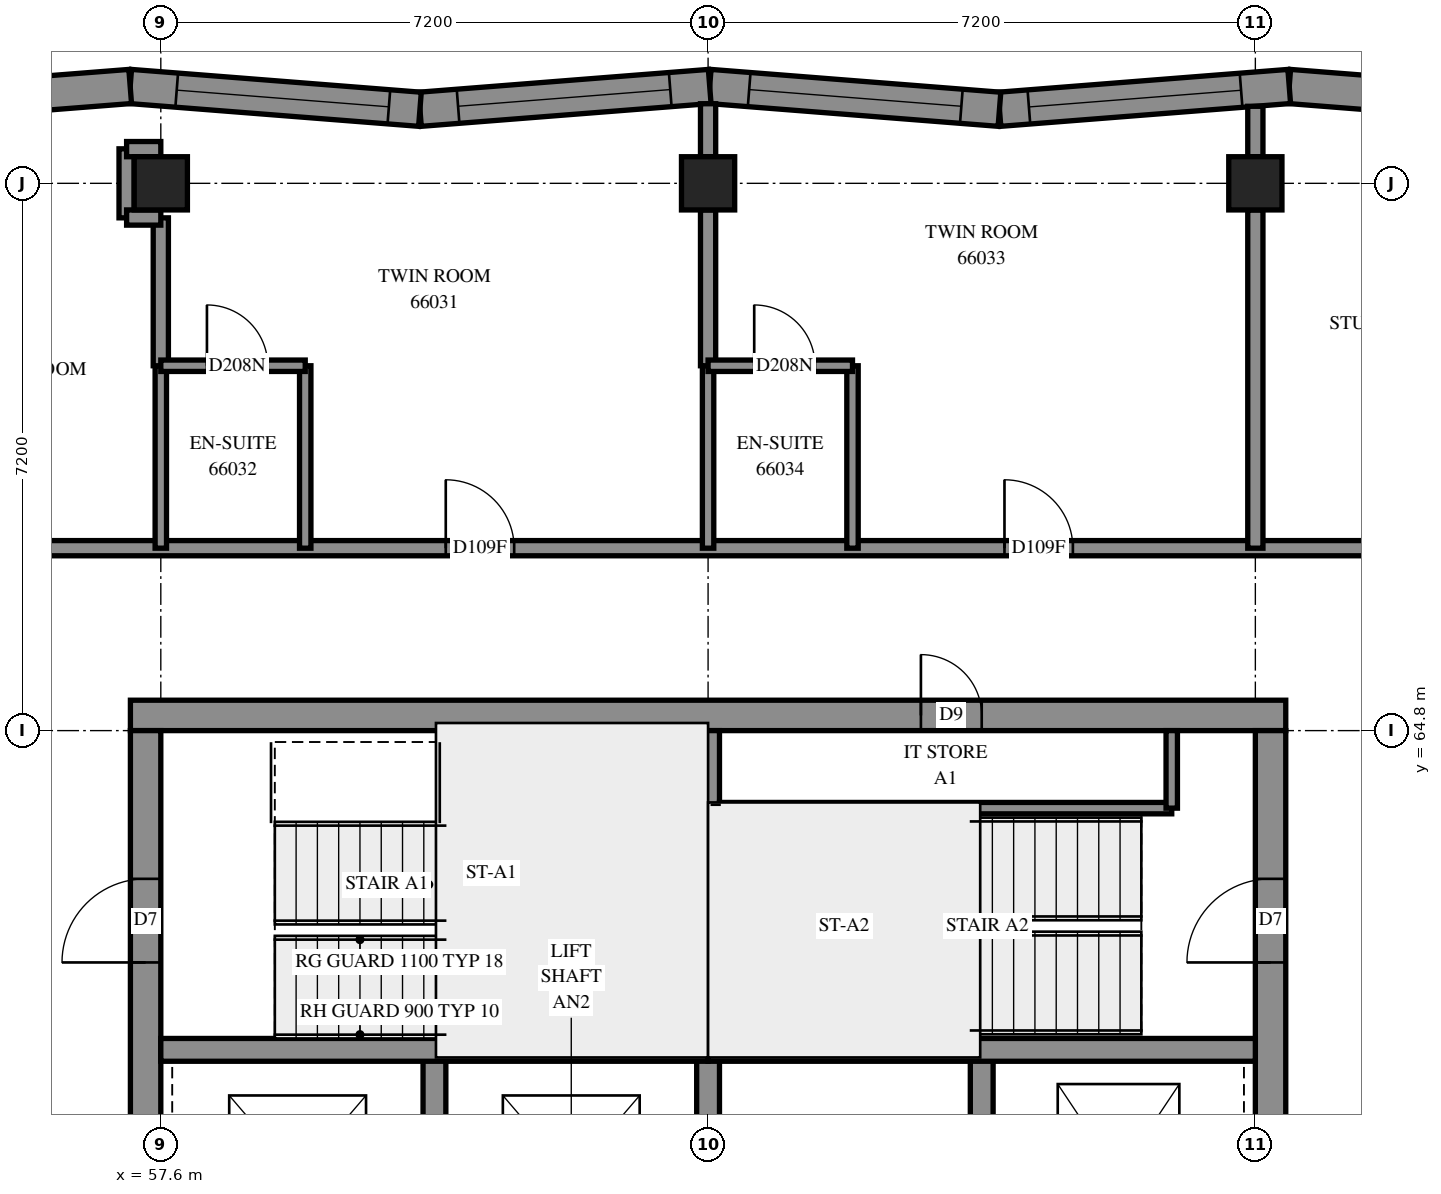
"""IFC4 building model, lengths in metres.
Left out: names, types, materials, properties, quantities, classifications, styles, units other than length and angle.
Written with IfcOpenShell. Run it as: python <this file> out.ifc"""

import sys

from ifc_helpers import new_model, si_unit, direction, frame, frame_2d, origin, origin_2d, place, context, subcontext, project, spatial, polyline, rectangle, outline, extrude, element, fill, save


model = new_model("IFC4")
c1 = context("Model", 3, precision=1e-05, world=origin(), true_north=direction((0.0, 1.0)))
c2 = subcontext(c1, "Body", "Model", "MODEL_VIEW")
j1 = project(units=[si_unit("LENGTHUNIT", "METRE"), si_unit("PLANEANGLEUNIT", "RADIAN")], contexts=[c1])
p1 = place(None, origin())
s1 = spatial("IfcSite", under=j1, at=p1, CompositionType="ELEMENT")
p2 = place(p1, origin())
s2 = spatial("IfcBuilding", under=s1, at=p2, CompositionType="ELEMENT")
p3 = place(p2, frame((0.0, 0.0, 243.8)))
s3 = spatial("IfcBuildingStorey", under=s2, at=p3, CompositionType="ELEMENT", Elevation=243.8)
for number, where, z_axis, x_axis in (
    (1, (57.6, 72.0, 0.0), (0.0, 0.0, 1.0), (1.0, 0.0, 0.0)),
    (2, (64.8, 72.0, 0.0), (0.0, 0.0, 1.0), (1.0, 0.0, 0.0)),
    (3, (72.0, 72.0, 0.0), (0.0, 0.0, 1.0), (1.0, 0.0, 0.0)),
):
    element("IfcColumn", number, at=place(p3, frame(where, z_axis=z_axis, x_axis=x_axis)), inside=s3, PredefinedType="COLUMN", context=c2, shape_type="SweptSolid", body=[
        extrude(rectangle(XDim=0.7, YDim=0.7, at=origin_2d()), origin(), (0.0, 0.0, 1.0), 3.1),
    ])
p4 = place(p3, frame((57.2, 65.0, -0.3), z_axis=(0.0, 0.0, 1.0), x_axis=(1.0, 0.0, 0.0)))
e4 = element("IfcWall", 4, at=p4, inside=s3, PredefinedType="SHEAR", context=c2, shape_type="SweptSolid", body=[
    extrude(rectangle(XDim=15.2, YDim=0.4, at=frame_2d((7.6, 0.0))), origin(), (0.0, 0.0, 1.0), 2.7),
])
p5 = place(p4, frame((10.4, 0.0, 0.3)))
e5 = element("IfcOpeningElement", 5, at=p5, cuts=e4, PredefinedType="OPENING", context=c2, shape_type="SweptSolid", body=[
    extrude(rectangle(XDim=0.8, YDim=2.1, at=frame_2d((0.4, 1.05))), frame((0.0, 0.21, 0.0), z_axis=(0.0, -1.0, 0.0), x_axis=(1.0, 0.0, 0.0)), (0.0, 0.0, 1.0), 0.42),
])
p6 = place(p3, frame((57.4, 50.4, -0.3), z_axis=(0.0, 0.0, 1.0), x_axis=(0.0, 1.0, 0.0)))
e6 = element("IfcWall", 6, at=p6, inside=s3, PredefinedType="SHEAR", context=c2, shape_type="SweptSolid", body=[
    extrude(rectangle(XDim=14.4, YDim=0.4, at=frame_2d((7.2, 0.0))), origin(), (0.0, 0.0, 1.0), 2.7),
])
p7 = place(p6, frame((4.55, 0.0, 0.3)))
e7 = element("IfcOpeningElement", 7, at=p7, cuts=e6, PredefinedType="OPENING", context=c2, shape_type="SweptSolid", body=[
    extrude(rectangle(XDim=1.1, YDim=2.1, at=frame_2d((0.55, 1.05))), frame((0.0, 0.21, 0.0), z_axis=(0.0, -1.0, 0.0), x_axis=(1.0, 0.0, 0.0)), (0.0, 0.0, 1.0), 0.42),
])
p8 = place(p6, frame((11.35, 0.0, 0.3)))
e8 = element("IfcOpeningElement", 8, at=p8, cuts=e6, PredefinedType="OPENING", context=c2, shape_type="SweptSolid", body=[
    extrude(rectangle(XDim=1.1, YDim=2.1, at=frame_2d((0.55, 1.05))), frame((0.0, 0.21, 0.0), z_axis=(0.0, -1.0, 0.0), x_axis=(1.0, 0.0, 0.0)), (0.0, 0.0, 1.0), 0.42),
])
p9 = place(p3, frame((72.2, 50.4, -0.3), z_axis=(0.0, 0.0, 1.0), x_axis=(0.0, 1.0, 0.0)))
e9 = element("IfcWall", 9, at=p9, inside=s3, PredefinedType="SHEAR", context=c2, shape_type="SweptSolid", body=[
    extrude(rectangle(XDim=14.4, YDim=0.4, at=frame_2d((7.2, 0.0))), origin(), (0.0, 0.0, 1.0), 2.7),
])
p10 = place(p9, frame((4.55, 0.0, 0.3)))
e10 = element("IfcOpeningElement", 10, at=p10, cuts=e9, PredefinedType="OPENING", context=c2, shape_type="SweptSolid", body=[
    extrude(rectangle(XDim=1.1, YDim=2.1, at=frame_2d((0.55, 1.05))), frame((0.0, 0.21, 0.0), z_axis=(0.0, -1.0, 0.0), x_axis=(1.0, 0.0, 0.0)), (0.0, 0.0, 1.0), 0.42),
])
p11 = place(p9, frame((11.35, 0.0, 0.3)))
e11 = element("IfcOpeningElement", 11, at=p11, cuts=e9, PredefinedType="OPENING", context=c2, shape_type="SweptSolid", body=[
    extrude(rectangle(XDim=1.1, YDim=2.1, at=frame_2d((0.55, 1.05))), frame((0.0, 0.21, 0.0), z_axis=(0.0, -1.0, 0.0), x_axis=(1.0, 0.0, 0.0)), (0.0, 0.0, 1.0), 0.42),
])
for number, where, z_axis, x_axis in (
    (12, (61.2, 57.3, 0.0), (0.0, 0.0, 1.0), (0.0, 1.0, 0.0)),
    (13, (64.8, 57.3, 0.0), (0.0, 0.0, 1.0), (0.0, 1.0, 0.0)),
    (14, (68.4, 57.3, 0.0), (0.0, 0.0, 1.0), (0.0, 1.0, 0.0)),
):
    element("IfcWall", number, at=place(p3, frame(where, z_axis=z_axis, x_axis=x_axis)), inside=s3, PredefinedType="SOLIDWALL", context=c2, shape_type="SweptSolid", body=[
        extrude(rectangle(XDim=3.3, YDim=0.3, at=frame_2d((1.65, 0.0))), origin(), (0.0, 0.0, 1.0), 3.1),
    ])
for number, where, z_axis, x_axis in (
    (15, (57.6, 60.6, 0.0), (0.0, 0.0, 1.0), (1.0, 0.0, 0.0)),
    (16, (64.8, 60.6, 0.0), (0.0, 0.0, 1.0), (1.0, 0.0, 0.0)),
):
    element("IfcWall", number, at=place(p3, frame(where, z_axis=z_axis, x_axis=x_axis)), inside=s3, PredefinedType="SOLIDWALL", context=c2, shape_type="SweptSolid", body=[
        extrude(rectangle(XDim=7.2, YDim=0.3, at=frame_2d((3.6, 0.0))), origin(), (0.0, 0.0, 1.0), 3.1),
    ])
p12 = place(p3, frame((64.8, 60.6, 0.0), z_axis=(0.0, 0.0, 1.0), x_axis=(0.0, 1.0, 0.0)))
e17 = element("IfcWall", 17, at=p12, inside=s3, PredefinedType="SOLIDWALL", context=c2, shape_type="SweptSolid", body=[
    extrude(rectangle(XDim=4.2, YDim=0.3, at=frame_2d((2.1, 0.0))), origin(), (0.0, 0.0, 1.0), 3.1),
])
p13 = place(p3, frame((76.275, 72.973, 0.0), z_axis=(0.0, 0.0, 1.0), x_axis=(-0.9969172534, 0.078460116, 0.0)))
e18 = element("IfcWall", 18, at=p13, inside=s3, PredefinedType="SOLIDWALL", context=c2, shape_type="SweptSolid", body=[
    extrude(outline(polyline([(0.035, -0.225), (3.859, -0.225), (3.824, 0.225), (-0.035, 0.225), (0.035, -0.225)])), origin(), (0.0, 0.0, 1.0), 3.1),
])
p14 = place(p13, frame((1.55, 0.0, 0.45)))
e19 = element("IfcOpeningElement", 19, at=p14, cuts=e18, PredefinedType="OPENING", context=c2, shape_type="SweptSolid", body=[
    extrude(rectangle(XDim=1.2, YDim=2.55, at=frame_2d((0.6, 1.275))), frame((0.0, 0.235, 0.0), z_axis=(0.0, -1.0, 0.0), x_axis=(1.0, 0.0, 0.0)), (0.0, 0.0, 1.0), 0.47),
])
p15 = place(p3, frame((72.446, 73.274, 0.0), z_axis=(0.0, 0.0, 1.0), x_axis=(-0.9969177178, -0.0784542156, 0.0)))
e20 = element("IfcWall", 20, at=p15, inside=s3, PredefinedType="SOLIDWALL", context=c2, shape_type="SweptSolid", body=[
    extrude(outline(polyline([(-0.018, -0.225), (3.806, -0.225), (3.842, 0.225), (0.018, 0.225), (-0.018, -0.225)])), origin(), (0.0, 0.0, 1.0), 3.1),
])
p16 = place(p15, frame((0.635, 0.0, 0.45)))
e21 = element("IfcOpeningElement", 21, at=p16, cuts=e20, PredefinedType="OPENING", context=c2, shape_type="SweptSolid", body=[
    extrude(rectangle(XDim=2.8, YDim=2.55, at=frame_2d((1.4, 1.275))), frame((0.0, 0.235, 0.0), z_axis=(0.0, -1.0, 0.0), x_axis=(1.0, 0.0, 0.0)), (0.0, 0.0, 1.0), 0.47),
])
p17 = place(p3, frame((68.633, 72.974, 0.0), z_axis=(0.0, 0.0, 1.0), x_axis=(-0.9969177178, 0.0784542156, 0.0)))
e22 = element("IfcWall", 22, at=p17, inside=s3, PredefinedType="SOLIDWALL", context=c2, shape_type="SweptSolid", body=[
    extrude(outline(polyline([(0.018, -0.225), (3.842, -0.225), (3.806, 0.225), (-0.018, 0.225), (0.018, -0.225)])), origin(), (0.0, 0.0, 1.0), 3.1),
])
p18 = place(p17, frame((0.503, 0.0, 0.45)))
e23 = element("IfcOpeningElement", 23, at=p18, cuts=e22, PredefinedType="OPENING", context=c2, shape_type="SweptSolid", body=[
    extrude(rectangle(XDim=2.8, YDim=2.55, at=frame_2d((1.4, 1.275))), frame((0.0, 0.235, 0.0), z_axis=(0.0, -1.0, 0.0), x_axis=(1.0, 0.0, 0.0)), (0.0, 0.0, 1.0), 0.47),
])
p19 = place(p3, frame((64.821, 73.274, 0.0), z_axis=(0.0, 0.0, 1.0), x_axis=(-0.9969178788, -0.0784521703, 0.0)))
e24 = element("IfcWall", 24, at=p19, inside=s3, PredefinedType="SOLIDWALL", context=c2, shape_type="SweptSolid", body=[
    extrude(outline(polyline([(-0.018, -0.225), (3.806, -0.225), (3.842, 0.225), (0.018, 0.225), (-0.018, -0.225)])), origin(), (0.0, 0.0, 1.0), 3.1),
])
p20 = place(p19, frame((0.521, 0.0, 0.45)))
e25 = element("IfcOpeningElement", 25, at=p20, cuts=e24, PredefinedType="OPENING", context=c2, shape_type="SweptSolid", body=[
    extrude(rectangle(XDim=2.8, YDim=2.55, at=frame_2d((1.4, 1.275))), frame((0.0, 0.235, 0.0), z_axis=(0.0, -1.0, 0.0), x_axis=(1.0, 0.0, 0.0)), (0.0, 0.0, 1.0), 0.47),
])
p21 = place(p3, frame((61.009, 72.974, 0.0), z_axis=(0.0, 0.0, 1.0), x_axis=(-0.9969177178, 0.0784542156, 0.0)))
e26 = element("IfcWall", 26, at=p21, inside=s3, PredefinedType="SOLIDWALL", context=c2, shape_type="SweptSolid", body=[
    extrude(outline(polyline([(0.018, -0.225), (3.842, -0.225), (3.806, 0.225), (-0.018, 0.225), (0.018, -0.225)])), origin(), (0.0, 0.0, 1.0), 3.1),
])
p22 = place(p21, frame((0.41, 0.0, 0.45)))
e27 = element("IfcOpeningElement", 27, at=p22, cuts=e26, PredefinedType="OPENING", context=c2, shape_type="SweptSolid", body=[
    extrude(rectangle(XDim=2.8, YDim=2.55, at=frame_2d((1.4, 1.275))), frame((0.0, 0.235, 0.0), z_axis=(0.0, -1.0, 0.0), x_axis=(1.0, 0.0, 0.0)), (0.0, 0.0, 1.0), 0.47),
])
p23 = place(p3, frame((57.197, 73.274, 0.0), z_axis=(0.0, 0.0, 1.0), x_axis=(-0.9969178788, -0.0784521703, 0.0)))
e28 = element("IfcWall", 28, at=p23, inside=s3, PredefinedType="SOLIDWALL", context=c2, shape_type="SweptSolid", body=[
    extrude(outline(polyline([(-0.018, -0.225), (3.806, -0.225), (3.842, 0.225), (0.018, 0.225), (-0.018, -0.225)])), origin(), (0.0, 0.0, 1.0), 3.1),
])
p24 = place(p23, frame((1.112, 0.0, 0.45)))
e29 = element("IfcOpeningElement", 29, at=p24, cuts=e28, PredefinedType="OPENING", context=c2, shape_type="SweptSolid", body=[
    extrude(rectangle(XDim=1.2, YDim=2.55, at=frame_2d((0.6, 1.275))), frame((0.0, 0.235, 0.0), z_axis=(0.0, -1.0, 0.0), x_axis=(1.0, 0.0, 0.0)), (0.0, 0.0, 1.0), 0.47),
])
p25 = place(p3, frame((64.95, 63.78, 0.0), z_axis=(0.0, 0.0, 1.0), x_axis=(1.0, 0.0, 0.0)))
e30 = element("IfcWall", 30, at=p25, inside=s3, PredefinedType="PARTITIONING", context=c2, shape_type="SweptSolid", body=[
    extrude(rectangle(XDim=5.95, YDim=0.15, at=frame_2d((2.975, 0.0))), origin(), (0.0, 0.0, 1.0), 3.1),
])
p26 = place(p3, frame((70.9, 63.78, 0.0), z_axis=(0.0, 0.0, 1.0), x_axis=(0.0, 1.0, 0.0)))
e31 = element("IfcWall", 31, at=p26, inside=s3, PredefinedType="PARTITIONING", context=c2, shape_type="SweptSolid", body=[
    extrude(rectangle(XDim=1.02, YDim=0.15, at=frame_2d((0.51, 0.0))), origin(), (0.0, 0.0, 1.0), 3.1),
])
p27 = place(p3, frame((55.2, 67.2, 0.0), z_axis=(0.0, 0.0, 1.0), x_axis=(1.0, 0.0, 0.0)))
e32 = element("IfcWall", 32, at=p27, inside=s3, PredefinedType="PARTITIONING", context=c2, shape_type="SweptSolid", body=[
    extrude(rectangle(XDim=19.2, YDim=0.2, at=frame_2d((9.6, 0.0))), origin(), (0.0, 0.0, 1.0), 3.1),
])
p28 = place(p27, frame((6.149, 0.0, 0.0)))
e33 = element("IfcOpeningElement", 33, at=p28, cuts=e32, PredefinedType="OPENING", context=c2, shape_type="SweptSolid", body=[
    extrude(rectangle(XDim=0.9, YDim=2.1, at=frame_2d((0.45, 1.05))), frame((0.0, 0.11, 0.0), z_axis=(0.0, -1.0, 0.0), x_axis=(1.0, 0.0, 0.0)), (0.0, 0.0, 1.0), 0.22),
])
p29 = place(p27, frame((13.499, 0.0, 0.0)))
e34 = element("IfcOpeningElement", 34, at=p29, cuts=e32, PredefinedType="OPENING", context=c2, shape_type="SweptSolid", body=[
    extrude(rectangle(XDim=0.9, YDim=2.1, at=frame_2d((0.45, 1.05))), frame((0.0, 0.11, 0.0), z_axis=(0.0, -1.0, 0.0), x_axis=(1.0, 0.0, 0.0)), (0.0, 0.0, 1.0), 0.22),
])
p30 = place(p3, frame((72.0, 67.2, 0.0), z_axis=(0.0, 0.0, 1.0), x_axis=(0.0, 1.0, 0.0)))
e35 = element("IfcWall", 35, at=p30, inside=s3, PredefinedType="PARTITIONING", context=c2, shape_type="SweptSolid", body=[
    extrude(rectangle(XDim=4.45, YDim=0.2, at=frame_2d((2.225, 0.0))), origin(), (0.0, 0.0, 1.0), 3.1),
])
for number, where, z_axis, x_axis in (
    (36, (59.5, 67.2, 0.0), (0.0, 0.0, 1.0), (0.0, 1.0, 0.0)),
    (37, (57.6, 67.2, 0.0), (0.0, 0.0, 1.0), (0.0, 1.0, 0.0)),
    (38, (66.7, 67.2, 0.0), (0.0, 0.0, 1.0), (0.0, 1.0, 0.0)),
    (39, (64.8, 67.2, 0.0), (0.0, 0.0, 1.0), (0.0, 1.0, 0.0)),
):
    element("IfcWall", number, at=place(p3, frame(where, z_axis=z_axis, x_axis=x_axis)), inside=s3, PredefinedType="PARTITIONING", context=c2, shape_type="SweptSolid", body=[
        extrude(rectangle(XDim=2.4, YDim=0.15, at=frame_2d((1.2, 0.0))), origin(), (0.0, 0.0, 1.0), 3.1),
    ])
p31 = place(p3, frame((64.8, 69.6, 0.0), z_axis=(0.0, 0.0, 1.0), x_axis=(0.0, 1.0, 0.0)))
e40 = element("IfcWall", 40, at=p31, inside=s3, PredefinedType="PARTITIONING", context=c2, shape_type="SweptSolid", body=[
    extrude(rectangle(XDim=2.05, YDim=0.2, at=frame_2d((1.025, 0.0))), origin(), (0.0, 0.0, 1.0), 3.1),
])
p32 = place(p3, frame((57.6, 69.6, 0.0), z_axis=(0.0, 0.0, 1.0), x_axis=(0.0, 1.0, 0.0)))
e41 = element("IfcWall", 41, at=p32, inside=s3, PredefinedType="PARTITIONING", context=c2, shape_type="SweptSolid", body=[
    extrude(rectangle(XDim=1.946, YDim=0.2, at=frame_2d((0.973, 0.0))), origin(), (0.0, 0.0, 1.0), 3.1),
])
p33 = place(p3, frame((64.8, 69.6, 0.0), z_axis=(0.0, 0.0, 1.0), x_axis=(1.0, 0.0, 0.0)))
e42 = element("IfcWall", 42, at=p33, inside=s3, PredefinedType="PARTITIONING", context=c2, shape_type="SweptSolid", body=[
    extrude(rectangle(XDim=1.9, YDim=0.15, at=frame_2d((0.95, 0.0))), origin(), (0.0, 0.0, 1.0), 3.1),
])
p34 = place(p33, frame((0.607, 0.0, 0.0)))
e43 = element("IfcOpeningElement", 43, at=p34, cuts=e42, PredefinedType="OPENING", context=c2, shape_type="SweptSolid", body=[
    extrude(rectangle(XDim=0.8, YDim=2.1, at=frame_2d((0.4, 1.05))), frame((0.0, 0.085, 0.0), z_axis=(0.0, -1.0, 0.0), x_axis=(1.0, 0.0, 0.0)), (0.0, 0.0, 1.0), 0.17),
])
p35 = place(p3, frame((57.6, 69.6, 0.0), z_axis=(0.0, 0.0, 1.0), x_axis=(1.0, 0.0, 0.0)))
e44 = element("IfcWall", 44, at=p35, inside=s3, PredefinedType="PARTITIONING", context=c2, shape_type="SweptSolid", body=[
    extrude(rectangle(XDim=1.9, YDim=0.15, at=frame_2d((0.95, 0.0))), origin(), (0.0, 0.0, 1.0), 3.1),
])
p36 = place(p35, frame((0.607, 0.0, 0.0)))
e45 = element("IfcOpeningElement", 45, at=p36, cuts=e44, PredefinedType="OPENING", context=c2, shape_type="SweptSolid", body=[
    extrude(rectangle(XDim=0.8, YDim=2.1, at=frame_2d((0.4, 1.05))), frame((0.0, 0.085, 0.0), z_axis=(0.0, -1.0, 0.0), x_axis=(1.0, 0.0, 0.0)), (0.0, 0.0, 1.0), 0.17),
])
p37 = place(p3, frame((57.15, 71.546, 0.0), z_axis=(0.0, 0.0, 1.0), x_axis=(0.0, 1.0, 0.0)))
e46 = element("IfcWall", 46, at=p37, inside=s3, PredefinedType="PARTITIONING", context=c2, shape_type="SweptSolid", body=[
    extrude(rectangle(XDim=0.908, YDim=0.2, at=frame_2d((0.454, 0.0))), origin(), (0.0, 0.0, 1.0), 3.1),
])
p38 = place(p3, frame((64.8, 72.35, 0.0), z_axis=(0.0, 0.0, 1.0), x_axis=(0.0, 1.0, 0.0)))
e47 = element("IfcWall", 47, at=p38, inside=s3, PredefinedType="PARTITIONING", context=c2, shape_type="SweptSolid", body=[
    extrude(rectangle(XDim=0.697, YDim=0.2, at=frame_2d((0.348, 0.0))), origin(), (0.0, 0.0, 1.0), 3.1),
])
p39 = place(p3, frame((72.0, 72.35, 0.0), z_axis=(0.0, 0.0, 1.0), x_axis=(0.0, 1.0, 0.0)))
e48 = element("IfcWall", 48, at=p39, inside=s3, PredefinedType="PARTITIONING", context=c2, shape_type="SweptSolid", body=[
    extrude(rectangle(XDim=0.663, YDim=0.2, at=frame_2d((0.332, 0.0))), origin(), (0.0, 0.0, 1.0), 3.1),
])
for number, where, z_axis, x_axis in (
    (49, (57.15, 72.45, 0.0), (0.0, 0.0, 1.0), (1.0, 0.0, 0.0)),
    (50, (57.15, 71.55, 0.0), (0.0, 0.0, 1.0), (1.0, 0.0, 0.0)),
):
    element("IfcWall", number, at=place(p3, frame(where, z_axis=z_axis, x_axis=x_axis)), inside=s3, PredefinedType="PARTITIONING", context=c2, shape_type="SweptSolid", body=[
        extrude(rectangle(XDim=0.45, YDim=0.2, at=frame_2d((0.225, 0.0))), origin(), (0.0, 0.0, 1.0), 3.1),
    ])
p40 = place(p16, origin())
e51 = element("IfcWindow", 51, at=p40, inside=s3, PartitioningType="SINGLE_PANEL", PredefinedType="WINDOW", context=c2, shape_type="SweptSolid", body=[
    extrude(rectangle(XDim=2.8, YDim=2.55, at=frame_2d((1.4, 1.275))), frame((0.0, 0.205, 0.0), z_axis=(0.0, -1.0, 0.0), x_axis=(1.0, 0.0, 0.0)), (0.0, 0.0, 1.0), 0.06),
])
fill(e21, e51)
p41 = place(p18, origin())
e52 = element("IfcWindow", 52, at=p41, inside=s3, PartitioningType="SINGLE_PANEL", PredefinedType="WINDOW", context=c2, shape_type="SweptSolid", body=[
    extrude(rectangle(XDim=2.8, YDim=2.55, at=frame_2d((1.4, 1.275))), frame((0.0, 0.205, 0.0), z_axis=(0.0, -1.0, 0.0), x_axis=(1.0, 0.0, 0.0)), (0.0, 0.0, 1.0), 0.06),
])
fill(e23, e52)
p42 = place(p20, origin())
e53 = element("IfcWindow", 53, at=p42, inside=s3, PartitioningType="SINGLE_PANEL", PredefinedType="WINDOW", context=c2, shape_type="SweptSolid", body=[
    extrude(rectangle(XDim=2.8, YDim=2.55, at=frame_2d((1.4, 1.275))), frame((0.0, 0.205, 0.0), z_axis=(0.0, -1.0, 0.0), x_axis=(1.0, 0.0, 0.0)), (0.0, 0.0, 1.0), 0.06),
])
fill(e25, e53)
p43 = place(p22, origin())
e54 = element("IfcWindow", 54, at=p43, inside=s3, PartitioningType="SINGLE_PANEL", PredefinedType="WINDOW", context=c2, shape_type="SweptSolid", body=[
    extrude(rectangle(XDim=2.8, YDim=2.55, at=frame_2d((1.4, 1.275))), frame((0.0, 0.205, 0.0), z_axis=(0.0, -1.0, 0.0), x_axis=(1.0, 0.0, 0.0)), (0.0, 0.0, 1.0), 0.06),
])
fill(e27, e54)
p44 = place(p5, origin())
e55 = element("IfcDoor", 55, at=p44, inside=s3, OperationType="SINGLE_SWING_RIGHT", PredefinedType="DOOR", context=c2, shape_type="SweptSolid", body=[
    extrude(rectangle(XDim=0.8, YDim=2.1, at=frame_2d((0.4, 1.05))), frame((0.0, 0.025, 0.0), z_axis=(0.0, -1.0, 0.0), x_axis=(1.0, 0.0, 0.0)), (0.0, 0.0, 1.0), 0.05),
])
fill(e5, e55)
p45 = place(p8, origin())
e56 = element("IfcDoor", 56, at=p45, inside=s3, OperationType="SINGLE_SWING_LEFT", PredefinedType="DOOR", context=c2, shape_type="SweptSolid", body=[
    extrude(rectangle(XDim=1.1, YDim=2.1, at=frame_2d((0.55, 1.05))), frame((0.0, 0.025, 0.0), z_axis=(0.0, -1.0, 0.0), x_axis=(1.0, 0.0, 0.0)), (0.0, 0.0, 1.0), 0.05),
])
fill(e8, e56)
p46 = place(p11, origin())
e57 = element("IfcDoor", 57, at=p46, inside=s3, OperationType="SINGLE_SWING_RIGHT", PredefinedType="DOOR", context=c2, shape_type="SweptSolid", body=[
    extrude(rectangle(XDim=1.1, YDim=2.1, at=frame_2d((0.55, 1.05))), frame((0.0, 0.025, 0.0), z_axis=(0.0, -1.0, 0.0), x_axis=(1.0, 0.0, 0.0)), (0.0, 0.0, 1.0), 0.05),
])
fill(e11, e57)
p47 = place(p28, origin())
e58 = element("IfcDoor", 58, at=p47, inside=s3, OperationType="SINGLE_SWING_RIGHT", PredefinedType="DOOR", context=c2, shape_type="SweptSolid", body=[
    extrude(rectangle(XDim=0.9, YDim=2.1, at=frame_2d((0.45, 1.05))), frame((0.0, 0.025, 0.0), z_axis=(0.0, -1.0, 0.0), x_axis=(1.0, 0.0, 0.0)), (0.0, 0.0, 1.0), 0.05),
])
fill(e33, e58)
p48 = place(p36, origin())
e59 = element("IfcDoor", 59, at=p48, inside=s3, OperationType="SINGLE_SWING_RIGHT", PredefinedType="DOOR", context=c2, shape_type="SweptSolid", body=[
    extrude(rectangle(XDim=0.8, YDim=2.1, at=frame_2d((0.4, 1.05))), frame((0.0, 0.025, 0.0), z_axis=(0.0, -1.0, 0.0), x_axis=(1.0, 0.0, 0.0)), (0.0, 0.0, 1.0), 0.05),
])
fill(e45, e59)
p49 = place(p29, origin())
e60 = element("IfcDoor", 60, at=p49, inside=s3, OperationType="SINGLE_SWING_RIGHT", PredefinedType="DOOR", context=c2, shape_type="SweptSolid", body=[
    extrude(rectangle(XDim=0.9, YDim=2.1, at=frame_2d((0.45, 1.05))), frame((0.0, 0.025, 0.0), z_axis=(0.0, -1.0, 0.0), x_axis=(1.0, 0.0, 0.0)), (0.0, 0.0, 1.0), 0.05),
])
fill(e34, e60)
p50 = place(p34, origin())
e61 = element("IfcDoor", 61, at=p50, inside=s3, OperationType="SINGLE_SWING_RIGHT", PredefinedType="DOOR", context=c2, shape_type="SweptSolid", body=[
    extrude(rectangle(XDim=0.8, YDim=2.1, at=frame_2d((0.4, 1.05))), frame((0.0, 0.025, 0.0), z_axis=(0.0, -1.0, 0.0), x_axis=(1.0, 0.0, 0.0)), (0.0, 0.0, 1.0), 0.05),
])
fill(e43, e61)
save(model, sys.argv[1])
